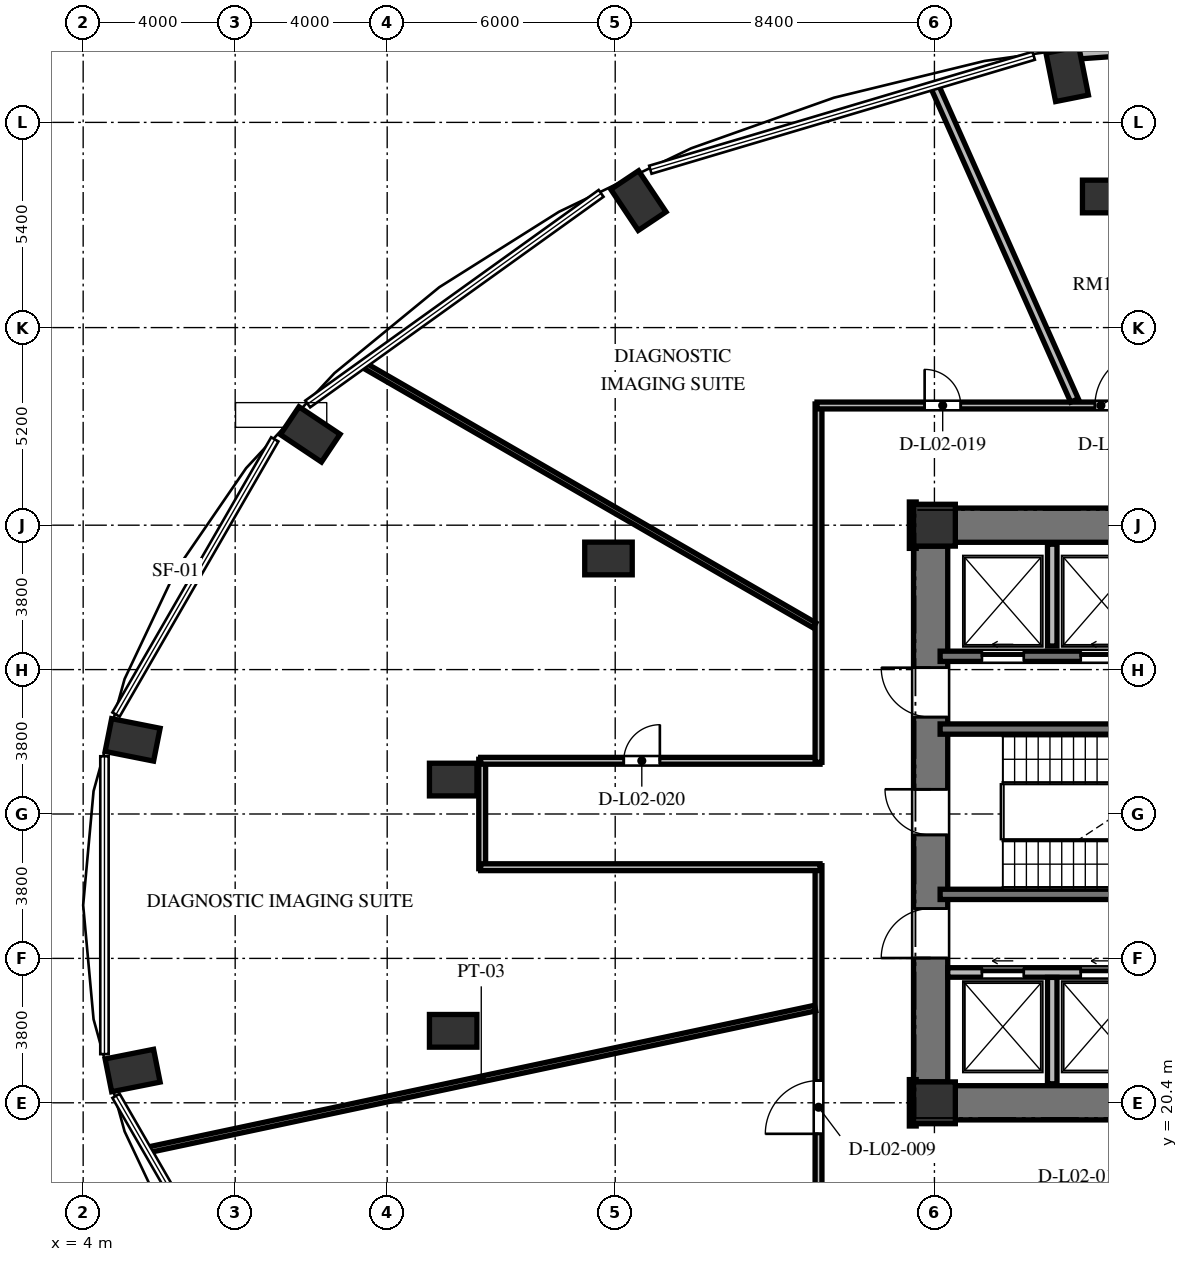
"""IFC4 building model, lengths in metres.
Left out: names, types, materials, properties, quantities, classifications, styles, units other than length and angle.
Written with IfcOpenShell. Run it as: python <this file> out.ifc"""

import sys

from ifc_helpers import new_model, si_unit, direction, frame, frame_2d, origin, origin_2d, place, context, subcontext, project, spatial, rectangle, extrude, element, fill, save


model = new_model("IFC4")
c1 = context("Model", 3, precision=1e-05, world=origin(), true_north=direction((0.0, 1.0)))
c2 = subcontext(c1, "Body", "Model", "MODEL_VIEW")
j1 = project(units=[si_unit("LENGTHUNIT", "METRE"), si_unit("PLANEANGLEUNIT", "RADIAN")], contexts=[c1])
p1 = place(None, origin())
s1 = spatial("IfcSite", under=j1, at=p1, CompositionType="ELEMENT")
p2 = place(p1, origin())
s2 = spatial("IfcBuilding", under=s1, at=p2, CompositionType="ELEMENT")
p3 = place(p2, frame((0.0, 0.0, 10.8)))
s3 = spatial("IfcBuildingStorey", under=s2, at=p3, CompositionType="ELEMENT", Elevation=10.8)
for number, where, z_axis, x_axis in (
    (1, (29.894, 47.471, 0.0), (0.0, 0.0, 1.0), (-0.195, 0.981, 0.0)),
    (2, (18.611, 44.142, 0.0), (0.0, 0.0, 1.0), (-0.556, 0.831, 0.0)),
    (3, (9.975, 37.989, 0.0), (0.0, 0.0, 1.0), (-0.831, 0.556, 0.0)),
    (4, (5.302, 29.95, 0.0), (0.0, 0.0, 1.0), (-0.981, 0.195, 0.0)),
    (5, (5.302, 21.25, 0.0), (0.0, 0.0, 1.0), (-0.981, -0.195, 0.0)),
):
    element("IfcColumn", number, at=place(p3, frame(where, z_axis=z_axis, x_axis=x_axis)), inside=s3, PredefinedType="COLUMN", context=c2, shape_type="SweptSolid", body=[
        extrude(rectangle(XDim=1.3, YDim=0.88, at=origin_2d()), origin(), (0.0, 0.0, 1.0), 4.8),
    ])
for number, where, z_axis, x_axis in (
    (6, (26.4, 20.4, 0.0), (0.0, 0.0, 1.0), (1.0, 0.0, 0.0)),
    (7, (26.4, 35.6, 0.0), (0.0, 0.0, 1.0), (1.0, 0.0, 0.0)),
):
    element("IfcColumn", number, at=place(p3, frame(where, z_axis=z_axis, x_axis=x_axis)), inside=s3, PredefinedType="COLUMN", context=c2, shape_type="SweptSolid", body=[
        extrude(rectangle(XDim=1.1, YDim=1.1, at=origin_2d()), origin(), (0.0, 0.0, 1.0), 4.8),
    ])
for number, where, z_axis, x_axis in (
    (8, (30.92, 44.25, 0.0), (0.0, 0.0, 1.0), (1.0, 0.0, 0.0)),
    (9, (17.823, 34.724, 0.0), (0.0, 0.0, 1.0), (1.0, 0.0, 0.0)),
    (10, (13.737, 28.906, 0.0), (0.0, 0.0, 1.0), (1.0, 0.0, 0.0)),
    (11, (13.737, 22.294, 0.0), (0.0, 0.0, 1.0), (1.0, 0.0, 0.0)),
):
    element("IfcColumn", number, at=place(p3, frame(where, z_axis=z_axis, x_axis=x_axis)), inside=s3, PredefinedType="COLUMN", context=c2, shape_type="SweptSolid", body=[
        extrude(rectangle(XDim=1.25, YDim=0.86, at=origin_2d()), origin(), (0.0, 0.0, 1.0), 4.8),
    ])
p4 = place(p3, frame((26.3, 20.95, 0.0), z_axis=(0.0, 0.0, 1.0), x_axis=(0.0, 1.0, 0.0)))
e12 = element("IfcWall", 12, at=p4, inside=s3, PredefinedType="SHEAR", context=c2, shape_type="SweptSolid", body=[
    extrude(rectangle(XDim=14.1, YDim=0.9, at=frame_2d((7.05, 0.0))), origin(), (0.0, 0.0, 1.0), 4.8),
])
p5 = place(p4, frame((6.5, 0.0, 0.0)))
e13 = element("IfcOpeningElement", 13, at=p5, cuts=e12, PredefinedType="OPENING", context=c2, shape_type="SweptSolid", body=[
    extrude(rectangle(XDim=1.2, YDim=2.15, at=frame_2d((0.6, 1.075))), frame((0.0, 0.46, 0.0), z_axis=(0.0, -1.0, 0.0), x_axis=(1.0, 0.0, 0.0)), (0.0, 0.0, 1.0), 0.92),
])
p6 = place(p4, frame((9.6, 0.0, 0.0)))
e14 = element("IfcOpeningElement", 14, at=p6, cuts=e12, PredefinedType="OPENING", context=c2, shape_type="SweptSolid", body=[
    extrude(rectangle(XDim=1.3, YDim=2.2, at=frame_2d((0.65, 1.1))), frame((0.0, 0.46, 0.0), z_axis=(0.0, -1.0, 0.0), x_axis=(1.0, 0.0, 0.0)), (0.0, 0.0, 1.0), 0.92),
])
p7 = place(p4, frame((3.26, 0.0, 0.0)))
e15 = element("IfcOpeningElement", 15, at=p7, cuts=e12, PredefinedType="OPENING", context=c2, shape_type="SweptSolid", body=[
    extrude(rectangle(XDim=1.3, YDim=2.2, at=frame_2d((0.65, 1.1))), frame((0.0, 0.46, 0.0), z_axis=(0.0, -1.0, 0.0), x_axis=(1.0, 0.0, 0.0)), (0.0, 0.0, 1.0), 0.92),
])
for number, where, z_axis, x_axis in (
    (16, (26.95, 20.4, 0.0), (0.0, 0.0, 1.0), (1.0, 0.0, 0.0)),
    (17, (26.95, 35.6, 0.0), (0.0, 0.0, 1.0), (1.0, 0.0, 0.0)),
):
    element("IfcWall", number, at=place(p3, frame(where, z_axis=z_axis, x_axis=x_axis)), inside=s3, PredefinedType="SHEAR", context=c2, shape_type="SweptSolid", body=[
        extrude(rectangle(XDim=5.3, YDim=0.9, at=frame_2d((2.65, 0.0))), origin(), (0.0, 0.0, 1.0), 4.8),
    ])
p8 = place(p3, frame((36.179, 48.453, 0.0), z_axis=(0.0, 0.0, 1.0), x_axis=(-0.997513108184, -0.070481196075, 0.0)))
e18 = element("IfcWall", 18, at=p8, inside=s3, PredefinedType="SOLIDWALL", context=c2, shape_type="SweptSolid", body=[
    extrude(rectangle(XDim=6.457, YDim=0.32, at=frame_2d((3.229, 0.0))), origin(), (0.0, 0.0, 1.0), 4.52),
])
p9 = place(p8, frame((1.548, 0.0, 0.85)))
e19 = element("IfcOpeningElement", 19, at=p9, cuts=e18, PredefinedType="OPENING", context=c2, shape_type="SweptSolid", body=[
    extrude(rectangle(XDim=1.8, YDim=2.4, at=frame_2d((0.9, 1.2))), frame((0.0, 0.17, 0.0), z_axis=(0.0, -1.0, 0.0), x_axis=(1.0, 0.0, 0.0)), (0.0, 0.0, 1.0), 0.34),
])
for number, where, z_axis, x_axis in (
    (20, (26.55, 30.235, 0.0), (0.0, 0.0, 1.0), (1.0, 0.0, 0.0)),
    (21, (26.55, 25.885, 0.0), (0.0, 0.0, 1.0), (1.0, 0.0, 0.0)),
):
    element("IfcWall", number, at=place(p3, frame(where, z_axis=z_axis, x_axis=x_axis)), inside=s3, PredefinedType="SHEAR", context=c2, shape_type="SweptSolid", body=[
        extrude(rectangle(XDim=7.985, YDim=0.27, at=frame_2d((3.992, 0.0))), origin(), (0.0, 0.0, 1.0), 4.8),
    ])
p10 = place(p3, frame((26.55, 32.15, 0.0), z_axis=(0.0, 0.0, 1.0), x_axis=(1.0, 0.0, 0.0)))
e22 = element("IfcWall", 22, at=p10, inside=s3, PredefinedType="SHEAR", context=c2, shape_type="SweptSolid", body=[
    extrude(rectangle(XDim=16.4, YDim=0.27, at=frame_2d((8.2, 0.0))), origin(), (0.0, 0.0, 1.0), 4.8),
])
p11 = place(p10, frame((1.1, 0.0, 0.0)))
e23 = element("IfcOpeningElement", 23, at=p11, cuts=e22, PredefinedType="OPENING", context=c2, shape_type="SweptSolid", body=[
    extrude(rectangle(XDim=1.1, YDim=2.2, at=frame_2d((0.55, 1.1))), frame((0.0, 0.145, 0.0), z_axis=(0.0, -1.0, 0.0), x_axis=(1.0, 0.0, 0.0)), (0.0, 0.0, 1.0), 0.29),
])
p12 = place(p10, frame((3.7, 0.0, 0.0)))
e24 = element("IfcOpeningElement", 24, at=p12, cuts=e22, PredefinedType="OPENING", context=c2, shape_type="SweptSolid", body=[
    extrude(rectangle(XDim=1.1, YDim=2.2, at=frame_2d((0.55, 1.1))), frame((0.0, 0.145, 0.0), z_axis=(0.0, -1.0, 0.0), x_axis=(1.0, 0.0, 0.0)), (0.0, 0.0, 1.0), 0.29),
])
p13 = place(p10, frame((6.5, 0.0, 0.0)))
e25 = element("IfcOpeningElement", 25, at=p13, cuts=e22, PredefinedType="OPENING", context=c2, shape_type="SweptSolid", body=[
    extrude(rectangle(XDim=1.1, YDim=2.2, at=frame_2d((0.55, 1.1))), frame((0.0, 0.145, 0.0), z_axis=(0.0, -1.0, 0.0), x_axis=(1.0, 0.0, 0.0)), (0.0, 0.0, 1.0), 0.29),
])
p14 = place(p10, frame((9.1, 0.0, 0.0)))
e26 = element("IfcOpeningElement", 26, at=p14, cuts=e22, PredefinedType="OPENING", context=c2, shape_type="SweptSolid", body=[
    extrude(rectangle(XDim=1.1, YDim=2.2, at=frame_2d((0.55, 1.1))), frame((0.0, 0.145, 0.0), z_axis=(0.0, -1.0, 0.0), x_axis=(1.0, 0.0, 0.0)), (0.0, 0.0, 1.0), 0.29),
])
p15 = place(p10, frame((11.9, 0.0, 0.0)))
e27 = element("IfcOpeningElement", 27, at=p15, cuts=e22, PredefinedType="OPENING", context=c2, shape_type="SweptSolid", body=[
    extrude(rectangle(XDim=1.1, YDim=2.2, at=frame_2d((0.55, 1.1))), frame((0.0, 0.145, 0.0), z_axis=(0.0, -1.0, 0.0), x_axis=(1.0, 0.0, 0.0)), (0.0, 0.0, 1.0), 0.29),
])
p16 = place(p10, frame((14.5, 0.0, 0.0)))
e28 = element("IfcOpeningElement", 28, at=p16, cuts=e22, PredefinedType="OPENING", context=c2, shape_type="SweptSolid", body=[
    extrude(rectangle(XDim=1.1, YDim=2.2, at=frame_2d((0.55, 1.1))), frame((0.0, 0.145, 0.0), z_axis=(0.0, -1.0, 0.0), x_axis=(1.0, 0.0, 0.0)), (0.0, 0.0, 1.0), 0.29),
])
p17 = place(p3, frame((26.75, 23.83, 0.0), z_axis=(0.0, 0.0, 1.0), x_axis=(1.0, 0.0, 0.0)))
e29 = element("IfcWall", 29, at=p17, inside=s3, PredefinedType="SOLIDWALL", context=c2, shape_type="SweptSolid", body=[
    extrude(rectangle(XDim=16.2, YDim=0.25, at=frame_2d((8.1, 0.0))), origin(), (0.0, 0.0, 1.0), 4.52),
])
p18 = place(p17, frame((0.9, 0.0, 0.0)))
e30 = element("IfcOpeningElement", 30, at=p18, cuts=e29, PredefinedType="OPENING", context=c2, shape_type="SweptSolid", body=[
    extrude(rectangle(XDim=1.1, YDim=2.2, at=frame_2d((0.55, 1.1))), frame((0.0, 0.135, 0.0), z_axis=(0.0, -1.0, 0.0), x_axis=(1.0, 0.0, 0.0)), (0.0, 0.0, 1.0), 0.27),
])
p19 = place(p17, frame((3.5, 0.0, 0.0)))
e31 = element("IfcOpeningElement", 31, at=p19, cuts=e29, PredefinedType="OPENING", context=c2, shape_type="SweptSolid", body=[
    extrude(rectangle(XDim=1.1, YDim=2.2, at=frame_2d((0.55, 1.1))), frame((0.0, 0.135, 0.0), z_axis=(0.0, -1.0, 0.0), x_axis=(1.0, 0.0, 0.0)), (0.0, 0.0, 1.0), 0.27),
])
p20 = place(p17, frame((6.3, 0.0, 0.0)))
e32 = element("IfcOpeningElement", 32, at=p20, cuts=e29, PredefinedType="OPENING", context=c2, shape_type="SweptSolid", body=[
    extrude(rectangle(XDim=1.1, YDim=2.2, at=frame_2d((0.55, 1.1))), frame((0.0, 0.135, 0.0), z_axis=(0.0, -1.0, 0.0), x_axis=(1.0, 0.0, 0.0)), (0.0, 0.0, 1.0), 0.27),
])
p21 = place(p17, frame((8.9, 0.0, 0.0)))
e33 = element("IfcOpeningElement", 33, at=p21, cuts=e29, PredefinedType="OPENING", context=c2, shape_type="SweptSolid", body=[
    extrude(rectangle(XDim=1.1, YDim=2.2, at=frame_2d((0.55, 1.1))), frame((0.0, 0.135, 0.0), z_axis=(0.0, -1.0, 0.0), x_axis=(1.0, 0.0, 0.0)), (0.0, 0.0, 1.0), 0.27),
])
p22 = place(p17, frame((11.7, 0.0, 0.0)))
e34 = element("IfcOpeningElement", 34, at=p22, cuts=e29, PredefinedType="OPENING", context=c2, shape_type="SweptSolid", body=[
    extrude(rectangle(XDim=1.1, YDim=2.2, at=frame_2d((0.55, 1.1))), frame((0.0, 0.135, 0.0), z_axis=(0.0, -1.0, 0.0), x_axis=(1.0, 0.0, 0.0)), (0.0, 0.0, 1.0), 0.27),
])
p23 = place(p17, frame((14.15, 0.0, 0.0)))
e35 = element("IfcOpeningElement", 35, at=p23, cuts=e29, PredefinedType="OPENING", context=c2, shape_type="SweptSolid", body=[
    extrude(rectangle(XDim=1.4, YDim=2.3, at=frame_2d((0.7, 1.15))), frame((0.0, 0.135, 0.0), z_axis=(0.0, -1.0, 0.0), x_axis=(1.0, 0.0, 0.0)), (0.0, 0.0, 1.0), 0.27),
])
p24 = place(p3, frame((29.5, 32.42, 0.0), z_axis=(0.0, 0.0, 1.0), x_axis=(0.0, 1.0, 0.0)))
e36 = element("IfcWall", 36, at=p24, inside=s3, PredefinedType="SOLIDWALL", context=c2, shape_type="SweptSolid", body=[
    extrude(rectangle(XDim=2.68, YDim=0.25, at=frame_2d((1.34, 0.0))), origin(), (0.0, 0.0, 1.0), 4.52),
])
p25 = place(p3, frame((29.5, 20.9, 0.0), z_axis=(0.0, 0.0, 1.0), x_axis=(0.0, 1.0, 0.0)))
e37 = element("IfcWall", 37, at=p25, inside=s3, PredefinedType="SOLIDWALL", context=c2, shape_type="SweptSolid", body=[
    extrude(rectangle(XDim=2.8, YDim=0.25, at=frame_2d((1.4, 0.0))), origin(), (0.0, 0.0, 1.0), 4.52),
])
p26 = place(p3, frame((14.5, 26.56, 0.0), z_axis=(0.0, 0.0, 1.0), x_axis=(0.0, 1.0, 0.0)))
e38 = element("IfcWall", 38, at=p26, inside=s3, PredefinedType="PARTITIONING", context=c2, shape_type="SweptSolid", body=[
    extrude(rectangle(XDim=2.88, YDim=0.18, at=frame_2d((1.44, 0.0))), origin(), (0.0, 0.0, 1.0), 4.52),
])
p27 = place(p3, frame((14.46, 29.4, 0.0), z_axis=(0.0, 0.0, 1.0), x_axis=(1.0, 0.0, 0.0)))
e39 = element("IfcWall", 39, at=p27, inside=s3, PredefinedType="PARTITIONING", context=c2, shape_type="SweptSolid", body=[
    extrude(rectangle(XDim=8.93, YDim=0.18, at=frame_2d((4.465, 0.0))), origin(), (0.0, 0.0, 1.0), 4.52),
])
p28 = place(p27, frame((3.765, 0.0, 0.0)))
e40 = element("IfcOpeningElement", 40, at=p28, cuts=e39, PredefinedType="OPENING", context=c2, shape_type="SweptSolid", body=[
    extrude(rectangle(XDim=0.95, YDim=2.1, at=frame_2d((0.475, 1.05))), frame((0.0, 0.1, 0.0), z_axis=(0.0, -1.0, 0.0), x_axis=(1.0, 0.0, 0.0)), (0.0, 0.0, 1.0), 0.2),
])
p29 = place(p3, frame((23.35, 29.36, 0.0), z_axis=(0.0, 0.0, 1.0), x_axis=(0.0, 1.0, 0.0)))
e41 = element("IfcWall", 41, at=p29, inside=s3, PredefinedType="PARTITIONING", context=c2, shape_type="SweptSolid", body=[
    extrude(rectangle(XDim=9.43, YDim=0.18, at=frame_2d((4.715, 0.0))), origin(), (0.0, 0.0, 1.0), 4.52),
])
p30 = place(p3, frame((23.31, 38.75, 0.0), z_axis=(0.0, 0.0, 1.0), x_axis=(1.0, 0.0, 0.0)))
e42 = element("IfcWall", 42, at=p30, inside=s3, PredefinedType="PARTITIONING", context=c2, shape_type="SweptSolid", body=[
    extrude(rectangle(XDim=29.88, YDim=0.18, at=frame_2d((14.94, 0.0))), origin(), (0.0, 0.0, 1.0), 4.52),
])
p31 = place(p30, frame((25.211, 0.0, 0.0)))
e43 = element("IfcOpeningElement", 43, at=p31, cuts=e42, PredefinedType="OPENING", context=c2, shape_type="SweptSolid", body=[
    extrude(rectangle(XDim=1.4, YDim=2.2, at=frame_2d((0.7, 1.1))), frame((0.0, 0.1, 0.0), z_axis=(0.0, -1.0, 0.0), x_axis=(1.0, 0.0, 0.0)), (0.0, 0.0, 1.0), 0.2),
])
p32 = place(p30, frame((18.158, 0.0, 0.0)))
e44 = element("IfcOpeningElement", 44, at=p32, cuts=e42, PredefinedType="OPENING", context=c2, shape_type="SweptSolid", body=[
    extrude(rectangle(XDim=1.05, YDim=2.15, at=frame_2d((0.525, 1.075))), frame((0.0, 0.1, 0.0), z_axis=(0.0, -1.0, 0.0), x_axis=(1.0, 0.0, 0.0)), (0.0, 0.0, 1.0), 0.2),
])
p33 = place(p30, frame((11.785, 0.0, 0.0)))
e45 = element("IfcOpeningElement", 45, at=p33, cuts=e42, PredefinedType="OPENING", context=c2, shape_type="SweptSolid", body=[
    extrude(rectangle(XDim=1.05, YDim=2.15, at=frame_2d((0.525, 1.075))), frame((0.0, 0.1, 0.0), z_axis=(0.0, -1.0, 0.0), x_axis=(1.0, 0.0, 0.0)), (0.0, 0.0, 1.0), 0.2),
])
p34 = place(p30, frame((7.314, 0.0, 0.0)))
e46 = element("IfcOpeningElement", 46, at=p34, cuts=e42, PredefinedType="OPENING", context=c2, shape_type="SweptSolid", body=[
    extrude(rectangle(XDim=1.4, YDim=2.2, at=frame_2d((0.7, 1.1))), frame((0.0, 0.1, 0.0), z_axis=(0.0, -1.0, 0.0), x_axis=(1.0, 0.0, 0.0)), (0.0, 0.0, 1.0), 0.2),
])
p35 = place(p30, frame((2.832, 0.0, 0.0)))
e47 = element("IfcOpeningElement", 47, at=p35, cuts=e42, PredefinedType="OPENING", context=c2, shape_type="SweptSolid", body=[
    extrude(rectangle(XDim=0.95, YDim=2.1, at=frame_2d((0.475, 1.05))), frame((0.0, 0.1, 0.0), z_axis=(0.0, -1.0, 0.0), x_axis=(1.0, 0.0, 0.0)), (0.0, 0.0, 1.0), 0.2),
])
for number, where, z_axis, x_axis in (
    (48, (25.83, 36.21, 0.0), (0.0, 0.0, 1.0), (0.0, -1.0, 0.0)),
    (49, (25.83, 21.01, 0.0), (0.0, 0.0, 1.0), (0.0, -1.0, 0.0)),
):
    element("IfcWall", number, at=place(p3, frame(where, z_axis=z_axis, x_axis=x_axis)), inside=s3, PredefinedType="PARTITIONING", context=c2, shape_type="SweptSolid", body=[
        extrude(rectangle(XDim=1.22, YDim=0.18, at=frame_2d((0.61, 0.0))), origin(), (0.0, 0.0, 1.0), 4.52),
    ])
p36 = place(p3, frame((23.35, 17.36, 0.0), z_axis=(0.0, 0.0, 1.0), x_axis=(0.0, 1.0, 0.0)))
e50 = element("IfcWall", 50, at=p36, inside=s3, PredefinedType="PARTITIONING", context=c2, shape_type="SweptSolid", body=[
    extrude(rectangle(XDim=9.28, YDim=0.18, at=frame_2d((4.64, 0.0))), origin(), (0.0, 0.0, 1.0), 4.52),
])
p37 = place(p36, frame((2.224, 0.0, 0.0)))
e51 = element("IfcOpeningElement", 51, at=p37, cuts=e50, PredefinedType="OPENING", context=c2, shape_type="SweptSolid", body=[
    extrude(rectangle(XDim=1.4, YDim=2.2, at=frame_2d((0.7, 1.1))), frame((0.0, 0.1, 0.0), z_axis=(0.0, -1.0, 0.0), x_axis=(1.0, 0.0, 0.0)), (0.0, 0.0, 1.0), 0.2),
])
p38 = place(p3, frame((23.39, 26.6, 0.0), z_axis=(0.0, 0.0, 1.0), x_axis=(-1.0, 0.0, 0.0)))
e52 = element("IfcWall", 52, at=p38, inside=s3, PredefinedType="PARTITIONING", context=c2, shape_type="SweptSolid", body=[
    extrude(rectangle(XDim=8.93, YDim=0.18, at=frame_2d((4.465, 0.0))), origin(), (0.0, 0.0, 1.0), 4.52),
])
p39 = place(p3, frame((30.086, 38.883, 0.0), z_axis=(0.0, 0.0, 1.0), x_axis=(-0.406742961245, 0.913542644586, 0.0)))
e53 = element("IfcWall", 53, at=p39, inside=s3, PredefinedType="PARTITIONING", context=c2, shape_type="SweptSolid", body=[
    extrude(rectangle(XDim=9.067, YDim=0.22, at=frame_2d((4.534, 0.0))), origin(), (0.0, 0.0, 1.0), 4.52),
])
p40 = place(p3, frame((23.243, 32.965, 0.0), z_axis=(0.0, 0.0, 1.0), x_axis=(-0.866019355129, 0.500010476433, 0.0)))
e54 = element("IfcWall", 54, at=p40, inside=s3, PredefinedType="PARTITIONING", context=c2, shape_type="SweptSolid", body=[
    extrude(rectangle(XDim=13.721, YDim=0.15, at=frame_2d((6.86, 0.0))), origin(), (0.0, 0.0, 1.0), 4.52),
])
p41 = place(p3, frame((23.261, 22.892, 0.0), z_axis=(0.0, 0.0, 1.0), x_axis=(-0.978149523722, -0.207902643662, 0.0)))
e55 = element("IfcWall", 55, at=p41, inside=s3, PredefinedType="PARTITIONING", context=c2, shape_type="SweptSolid", body=[
    extrude(rectangle(XDim=17.963, YDim=0.15, at=frame_2d((8.982, 0.0))), origin(), (0.0, 0.0, 1.0), 4.52),
])
p42 = place(p5, origin())
e56 = element("IfcDoor", 56, at=p42, inside=s3, OperationType="SINGLE_SWING_RIGHT", PredefinedType="DOOR", context=c2, shape_type="SweptSolid", body=[
    extrude(rectangle(XDim=1.2, YDim=2.15, at=frame_2d((0.6, 1.075))), frame((0.0, 0.025, 0.0), z_axis=(0.0, -1.0, 0.0), x_axis=(1.0, 0.0, 0.0)), (0.0, 0.0, 1.0), 0.05),
])
fill(e13, e56)
p43 = place(p6, origin())
e57 = element("IfcDoor", 57, at=p43, inside=s3, OperationType="SINGLE_SWING_RIGHT", PredefinedType="DOOR", context=c2, shape_type="SweptSolid", body=[
    extrude(rectangle(XDim=1.3, YDim=2.2, at=frame_2d((0.65, 1.1))), frame((0.0, 0.025, 0.0), z_axis=(0.0, -1.0, 0.0), x_axis=(1.0, 0.0, 0.0)), (0.0, 0.0, 1.0), 0.05),
])
fill(e14, e57)
p44 = place(p7, origin())
e58 = element("IfcDoor", 58, at=p44, inside=s3, OperationType="SINGLE_SWING_LEFT", PredefinedType="DOOR", context=c2, shape_type="SweptSolid", body=[
    extrude(rectangle(XDim=1.3, YDim=2.2, at=frame_2d((0.65, 1.1))), frame((0.0, 0.025, 0.0), z_axis=(0.0, -1.0, 0.0), x_axis=(1.0, 0.0, 0.0)), (0.0, 0.0, 1.0), 0.05),
])
fill(e15, e58)
p45 = place(p11, origin())
e59 = element("IfcDoor", 59, at=p45, inside=s3, OperationType="SLIDING_TO_LEFT", PredefinedType="DOOR", context=c2, shape_type="SweptSolid", body=[
    extrude(rectangle(XDim=1.1, YDim=2.2, at=frame_2d((0.55, 1.1))), frame((0.0, 0.025, 0.0), z_axis=(0.0, -1.0, 0.0), x_axis=(1.0, 0.0, 0.0)), (0.0, 0.0, 1.0), 0.05),
])
fill(e23, e59)
p46 = place(p12, origin())
e60 = element("IfcDoor", 60, at=p46, inside=s3, OperationType="SLIDING_TO_LEFT", PredefinedType="DOOR", context=c2, shape_type="SweptSolid", body=[
    extrude(rectangle(XDim=1.1, YDim=2.2, at=frame_2d((0.55, 1.1))), frame((0.0, 0.025, 0.0), z_axis=(0.0, -1.0, 0.0), x_axis=(1.0, 0.0, 0.0)), (0.0, 0.0, 1.0), 0.05),
])
fill(e24, e60)
p47 = place(p18, origin())
e61 = element("IfcDoor", 61, at=p47, inside=s3, OperationType="SLIDING_TO_LEFT", PredefinedType="DOOR", context=c2, shape_type="SweptSolid", body=[
    extrude(rectangle(XDim=1.1, YDim=2.2, at=frame_2d((0.55, 1.1))), frame((0.0, 0.025, 0.0), z_axis=(0.0, -1.0, 0.0), x_axis=(1.0, 0.0, 0.0)), (0.0, 0.0, 1.0), 0.05),
])
fill(e30, e61)
p48 = place(p19, origin())
e62 = element("IfcDoor", 62, at=p48, inside=s3, OperationType="SLIDING_TO_LEFT", PredefinedType="DOOR", context=c2, shape_type="SweptSolid", body=[
    extrude(rectangle(XDim=1.1, YDim=2.2, at=frame_2d((0.55, 1.1))), frame((0.0, 0.025, 0.0), z_axis=(0.0, -1.0, 0.0), x_axis=(1.0, 0.0, 0.0)), (0.0, 0.0, 1.0), 0.05),
])
fill(e31, e62)
p49 = place(p37, origin())
e63 = element("IfcDoor", 63, at=p49, inside=s3, OperationType="SINGLE_SWING_LEFT", PredefinedType="DOOR", context=c2, shape_type="SweptSolid", body=[
    extrude(rectangle(XDim=1.4, YDim=2.2, at=frame_2d((0.7, 1.1))), frame((0.0, 0.025, 0.0), z_axis=(0.0, -1.0, 0.0), x_axis=(1.0, 0.0, 0.0)), (0.0, 0.0, 1.0), 0.05),
])
fill(e51, e63)
p50 = place(p34, origin())
e64 = element("IfcDoor", 64, at=p50, inside=s3, OperationType="SINGLE_SWING_RIGHT", PredefinedType="DOOR", context=c2, shape_type="SweptSolid", body=[
    extrude(rectangle(XDim=1.4, YDim=2.2, at=frame_2d((0.7, 1.1))), frame((0.0, 0.025, 0.0), z_axis=(0.0, -1.0, 0.0), x_axis=(1.0, 0.0, 0.0)), (0.0, 0.0, 1.0), 0.05),
])
fill(e46, e64)
p51 = place(p35, origin())
e65 = element("IfcDoor", 65, at=p51, inside=s3, OperationType="SINGLE_SWING_LEFT", PredefinedType="DOOR", context=c2, shape_type="SweptSolid", body=[
    extrude(rectangle(XDim=0.95, YDim=2.1, at=frame_2d((0.475, 1.05))), frame((0.0, 0.025, 0.0), z_axis=(0.0, -1.0, 0.0), x_axis=(1.0, 0.0, 0.0)), (0.0, 0.0, 1.0), 0.05),
])
fill(e47, e65)
p52 = place(p28, origin())
e66 = element("IfcDoor", 66, at=p52, inside=s3, OperationType="SINGLE_SWING_RIGHT", PredefinedType="DOOR", context=c2, shape_type="SweptSolid", body=[
    extrude(rectangle(XDim=0.95, YDim=2.1, at=frame_2d((0.475, 1.05))), frame((0.0, 0.025, 0.0), z_axis=(0.0, -1.0, 0.0), x_axis=(1.0, 0.0, 0.0)), (0.0, 0.0, 1.0), 0.05),
])
fill(e40, e66)
save(model, sys.argv[1])
